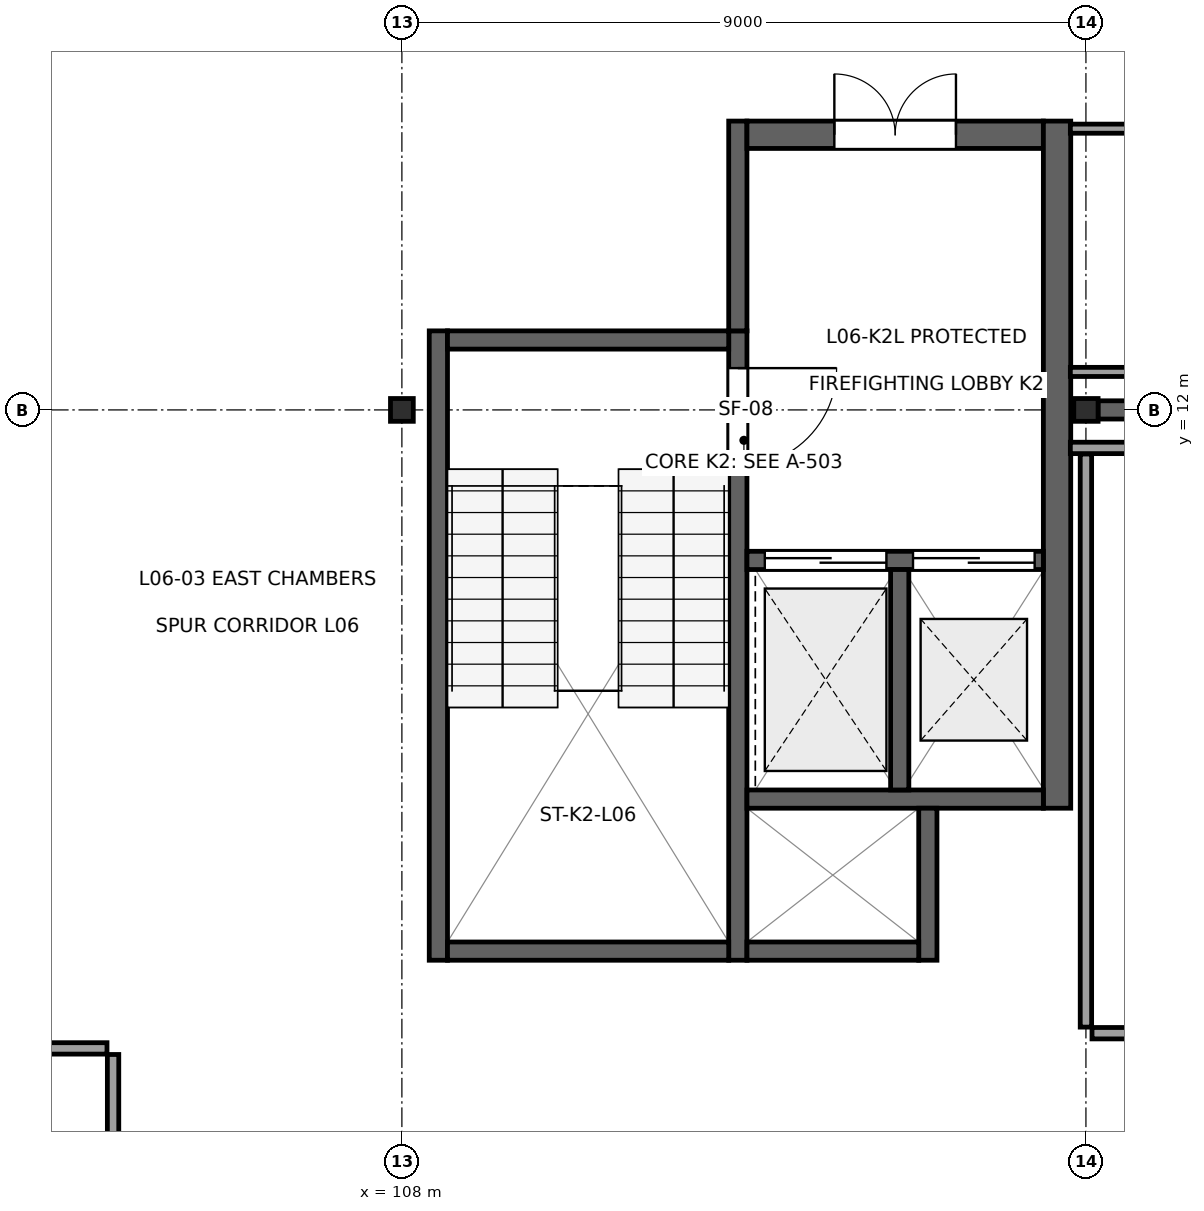
"""IFC4 building model, lengths in metres.
Left out: names, types, materials, properties, quantities, classifications, styles, units other than length and angle.
Written with IfcOpenShell. Run it as: python <this file> out.ifc"""

import sys

from ifc_helpers import new_model, si_unit, direction, frame, frame_2d, origin, origin_2d, place, context, subcontext, project, spatial, rectangle, i_section, extrude, element, fill, save


model = new_model("IFC4")
c1 = context("Model", 3, precision=1e-05, world=origin(), true_north=direction((0.0, 1.0)))
c2 = subcontext(c1, "Body", "Model", "MODEL_VIEW")
j1 = project(units=[si_unit("LENGTHUNIT", "METRE"), si_unit("PLANEANGLEUNIT", "RADIAN")], contexts=[c1])
p1 = place(None, origin())
s1 = spatial("IfcSite", under=j1, at=p1, CompositionType="ELEMENT")
p2 = place(p1, origin())
s2 = spatial("IfcBuilding", under=s1, at=p2, CompositionType="ELEMENT")
p3 = place(p2, frame((0.0, 0.0, 27.4)))
s3 = spatial("IfcBuildingStorey", under=s2, at=p3, CompositionType="ELEMENT", Elevation=27.4)
p4 = place(p3, frame((108.0, 12.0, 0.0), z_axis=(0.0, 0.0, 1.0), x_axis=(1.0, 0.0, 0.0)))
e1 = element("IfcColumn", 1, at=p4, inside=s3, PredefinedType="COLUMN", context=c2, shape_type="SweptSolid", body=[
    extrude(i_section(OverallWidth=0.3, OverallDepth=0.3, WebThickness=0.011, FlangeThickness=0.019, at=origin_2d()), origin(), (0.0, 0.0, 1.0), 4.0),
])
p5 = place(p3, frame((117.0, 12.0, 0.0), z_axis=(0.0, 0.0, 1.0), x_axis=(0.0, 1.0, 0.0)))
e2 = element("IfcColumn", 2, at=p5, inside=s3, PredefinedType="COLUMN", context=c2, shape_type="SweptSolid", body=[
    extrude(i_section(OverallWidth=0.3, OverallDepth=0.32, WebThickness=0.011, FlangeThickness=0.021, at=origin_2d()), origin(), (0.0, 0.0, 1.0), 4.0),
])
p6 = place(p3, frame((108.48, 4.76, 0.0), z_axis=(0.0, 0.0, 1.0), x_axis=(0.0, 1.0, 0.0)))
e3 = element("IfcWall", 3, at=p6, inside=s3, PredefinedType="SHEAR", context=c2, shape_type="SweptSolid", body=[
    extrude(rectangle(XDim=8.28, YDim=0.24, at=frame_2d((4.14, 0.0))), origin(), (0.0, 0.0, 1.0), 3.81),
])
p7 = place(p3, frame((112.42, 4.76, 0.0), z_axis=(0.0, 0.0, 1.0), x_axis=(0.0, 1.0, 0.0)))
e4 = element("IfcWall", 4, at=p7, inside=s3, PredefinedType="SHEAR", context=c2, shape_type="SweptSolid", body=[
    extrude(rectangle(XDim=8.28, YDim=0.24, at=frame_2d((4.14, 0.0))), origin(), (0.0, 0.0, 1.0), 3.81),
])
p8 = place(p7, frame((6.49, 0.0, 0.0)))
e5 = element("IfcOpeningElement", 5, at=p8, cuts=e4, PredefinedType="OPENING", context=c2, shape_type="SweptSolid", body=[
    extrude(rectangle(XDim=1.3, YDim=2.2, at=frame_2d((0.65, 1.1))), frame((0.0, 0.135, 0.0), z_axis=(0.0, -1.0, 0.0), x_axis=(1.0, 0.0, 0.0)), (0.0, 0.0, 1.0), 0.27),
])
for number, where, z_axis, x_axis in (
    (6, (108.6, 4.88, 0.0), (0.0, 0.0, 1.0), (1.0, 0.0, 0.0)),
    (7, (108.6, 12.92, 0.0), (0.0, 0.0, 1.0), (1.0, 0.0, 0.0)),
):
    element("IfcWall", number, at=place(p3, frame(where, z_axis=z_axis, x_axis=x_axis)), inside=s3, PredefinedType="SHEAR", context=c2, shape_type="SweptSolid", body=[
        extrude(rectangle(XDim=3.7, YDim=0.24, at=frame_2d((1.85, 0.0))), origin(), (0.0, 0.0, 1.0), 3.81),
    ])
p9 = place(p3, frame((112.42, 13.04, 0.0), z_axis=(0.0, 0.0, 1.0), x_axis=(0.0, 1.0, 0.0)))
e8 = element("IfcWall", 8, at=p9, inside=s3, PredefinedType="SHEAR", context=c2, shape_type="SweptSolid", body=[
    extrude(rectangle(XDim=2.76, YDim=0.24, at=frame_2d((1.38, 0.0))), origin(), (0.0, 0.0, 1.0), 3.66),
])
p10 = place(p3, frame((112.54, 15.62, 0.0), z_axis=(0.0, 0.0, 1.0), x_axis=(1.0, 0.0, 0.0)))
e9 = element("IfcWall", 9, at=p10, inside=s3, PredefinedType="SHEAR", context=c2, shape_type="SweptSolid", body=[
    extrude(rectangle(XDim=3.9, YDim=0.36, at=frame_2d((1.95, 0.0))), origin(), (0.0, 0.0, 1.0), 3.66),
])
p11 = place(p10, frame((1.15, 0.0, 0.0)))
e10 = element("IfcOpeningElement", 10, at=p11, cuts=e9, PredefinedType="OPENING", context=c2, shape_type="SweptSolid", body=[
    extrude(rectangle(XDim=1.6, YDim=2.25, at=frame_2d((0.8, 1.125))), frame((0.0, 0.195, 0.0), z_axis=(0.0, -1.0, 0.0), x_axis=(1.0, 0.0, 0.0)), (0.0, 0.0, 1.0), 0.39),
])
p12 = place(p3, frame((116.62, 6.76, 0.0), z_axis=(0.0, 0.0, 1.0), x_axis=(0.0, 1.0, 0.0)))
e11 = element("IfcWall", 11, at=p12, inside=s3, PredefinedType="SHEAR", context=c2, shape_type="SweptSolid", body=[
    extrude(rectangle(XDim=9.04, YDim=0.36, at=frame_2d((4.52, 0.0))), origin(), (0.0, 0.0, 1.0), 3.66),
])
p13 = place(p3, frame((112.54, 10.02, 0.0), z_axis=(0.0, 0.0, 1.0), x_axis=(1.0, 0.0, 0.0)))
e12 = element("IfcWall", 12, at=p13, inside=s3, PredefinedType="SHEAR", context=c2, shape_type="SweptSolid", body=[
    extrude(rectangle(XDim=3.9, YDim=0.24, at=frame_2d((1.95, 0.0))), origin(), (0.0, 0.0, 1.0), 3.81),
])
p14 = place(p13, frame((0.235, 0.0, 0.0)))
e13 = element("IfcOpeningElement", 13, at=p14, cuts=e12, PredefinedType="OPENING", context=c2, shape_type="SweptSolid", body=[
    extrude(rectangle(XDim=1.6, YDim=2.3, at=frame_2d((0.8, 1.15))), frame((0.0, 0.135, 0.0), z_axis=(0.0, -1.0, 0.0), x_axis=(1.0, 0.0, 0.0)), (0.0, 0.0, 1.0), 0.27),
])
p15 = place(p13, frame((2.185, 0.0, 0.0)))
e14 = element("IfcOpeningElement", 14, at=p15, cuts=e12, PredefinedType="OPENING", context=c2, shape_type="SweptSolid", body=[
    extrude(rectangle(XDim=1.6, YDim=2.3, at=frame_2d((0.8, 1.15))), frame((0.0, 0.135, 0.0), z_axis=(0.0, -1.0, 0.0), x_axis=(1.0, 0.0, 0.0)), (0.0, 0.0, 1.0), 0.27),
])
p16 = place(p3, frame((112.54, 6.88, 0.0), z_axis=(0.0, 0.0, 1.0), x_axis=(1.0, 0.0, 0.0)))
e15 = element("IfcWall", 15, at=p16, inside=s3, PredefinedType="SHEAR", context=c2, shape_type="SweptSolid", body=[
    extrude(rectangle(XDim=3.9, YDim=0.24, at=frame_2d((1.95, 0.0))), origin(), (0.0, 0.0, 1.0), 3.81),
])
p17 = place(p3, frame((114.55, 7.0, 0.0), z_axis=(0.0, 0.0, 1.0), x_axis=(0.0, 1.0, 0.0)))
e16 = element("IfcWall", 16, at=p17, inside=s3, PredefinedType="SHEAR", context=c2, shape_type="SweptSolid", body=[
    extrude(rectangle(XDim=2.9, YDim=0.24, at=frame_2d((1.45, 0.0))), origin(), (0.0, 0.0, 1.0), 3.81),
])
p18 = place(p3, frame((114.92, 4.76, 0.0), z_axis=(0.0, 0.0, 1.0), x_axis=(0.0, 1.0, 0.0)))
e17 = element("IfcWall", 17, at=p18, inside=s3, PredefinedType="SHEAR", context=c2, shape_type="SweptSolid", body=[
    extrude(rectangle(XDim=2.0, YDim=0.24, at=frame_2d((1.0, 0.0))), origin(), (0.0, 0.0, 1.0), 3.81),
])
p19 = place(p3, frame((112.54, 4.88, 0.0), z_axis=(0.0, 0.0, 1.0), x_axis=(1.0, 0.0, 0.0)))
e18 = element("IfcWall", 18, at=p19, inside=s3, PredefinedType="SHEAR", context=c2, shape_type="SweptSolid", body=[
    extrude(rectangle(XDim=2.26, YDim=0.24, at=frame_2d((1.13, 0.0))), origin(), (0.0, 0.0, 1.0), 3.81),
])
p20 = place(p3, frame((117.158, 12.0, 0.0), z_axis=(0.0, 0.0, 1.0), x_axis=(1.0, 0.0, 0.0)))
e19 = element("IfcWall", 19, at=p20, inside=s3, PredefinedType="SHEAR", context=c2, shape_type="SweptSolid", body=[
    extrude(rectangle(XDim=8.834, YDim=0.24, at=frame_2d((4.417, 0.0))), origin(), (0.0, 0.0, 1.0), 3.355),
])
p21 = place(p3, frame((45.88, 3.6, 0.0), z_axis=(0.0, 0.0, 1.0), x_axis=(1.0, 0.0, 0.0)))
e20 = element("IfcWall", 20, at=p21, inside=s3, PredefinedType="PARTITIONING", context=c2, shape_type="SweptSolid", body=[
    extrude(rectangle(XDim=58.24, YDim=0.15, at=frame_2d((29.12, 0.0))), origin(), (0.0, 0.0, 1.0), 3.64),
])
p22 = place(p21, frame((27.795, 0.0, 0.0)))
e21 = element("IfcOpeningElement", 21, at=p22, cuts=e20, PredefinedType="OPENING", context=c2, shape_type="SweptSolid", body=[
    extrude(rectangle(XDim=1.05, YDim=2.25, at=frame_2d((0.525, 1.125))), frame((0.0, 0.09, 0.0), z_axis=(0.0, -1.0, 0.0), x_axis=(1.0, 0.0, 0.0)), (0.0, 0.0, 1.0), 0.18),
])
p23 = place(p3, frame((104.2, 3.52, 0.0), z_axis=(0.0, 0.0, 1.0), x_axis=(0.0, -1.0, 0.0)))
e22 = element("IfcWall", 22, at=p23, inside=s3, PredefinedType="PARTITIONING", context=c2, shape_type="SweptSolid", body=[
    extrude(rectangle(XDim=3.385, YDim=0.15, at=frame_2d((1.692, 0.0))), origin(), (0.0, 0.0, 1.0), 3.64),
])
p24 = place(p3, frame((125.865, 3.8, 0.0), z_axis=(0.0, 0.0, 1.0), x_axis=(-1.0, 0.0, 0.0)))
e23 = element("IfcWall", 23, at=p24, inside=s3, PredefinedType="PARTITIONING", context=c2, shape_type="SweptSolid", body=[
    extrude(rectangle(XDim=8.785, YDim=0.15, at=frame_2d((4.393, 0.0))), origin(), (0.0, 0.0, 1.0), 3.64),
])
p25 = place(p24, frame((3.867, 0.0, 0.0)))
e24 = element("IfcOpeningElement", 24, at=p25, cuts=e23, PredefinedType="OPENING", context=c2, shape_type="SweptSolid", body=[
    extrude(rectangle(XDim=1.05, YDim=2.25, at=frame_2d((0.525, 1.125))), frame((0.0, 0.09, 0.0), z_axis=(0.0, -1.0, 0.0), x_axis=(1.0, 0.0, 0.0)), (0.0, 0.0, 1.0), 0.18),
])
p26 = place(p3, frame((117.0, 3.88, 0.0), z_axis=(0.0, 0.0, 1.0), x_axis=(0.0, 1.0, 0.0)))
e25 = element("IfcWall", 25, at=p26, inside=s3, PredefinedType="PARTITIONING", context=c2, shape_type="SweptSolid", body=[
    extrude(rectangle(XDim=7.54, YDim=0.15, at=frame_2d((3.77, 0.0))), origin(), (0.0, 0.0, 1.0), 3.355),
])
p27 = place(p3, frame((116.795, 11.5, 0.0), z_axis=(0.0, 0.0, 1.0), x_axis=(1.0, 0.0, 0.0)))
e26 = element("IfcWall", 26, at=p27, inside=s3, PredefinedType="PARTITIONING", context=c2, shape_type="SweptSolid", body=[
    extrude(rectangle(XDim=9.07, YDim=0.15, at=frame_2d((4.535, 0.0))), origin(), (0.0, 0.0, 1.0), 3.64),
])
p28 = place(p3, frame((125.865, 12.5, 0.0), z_axis=(0.0, 0.0, 1.0), x_axis=(-1.0, 0.0, 0.0)))
e27 = element("IfcWall", 27, at=p28, inside=s3, PredefinedType="PARTITIONING", context=c2, shape_type="SweptSolid", body=[
    extrude(rectangle(XDim=9.07, YDim=0.12, at=frame_2d((4.535, 0.0))), origin(), (0.0, 0.0, 1.0), 3.64),
])
p29 = place(p3, frame((116.795, 15.7, 0.0), z_axis=(0.0, 0.0, 1.0), x_axis=(1.0, 0.0, 0.0)))
e28 = element("IfcWall", 28, at=p29, inside=s3, PredefinedType="PARTITIONING", context=c2, shape_type="SweptSolid", body=[
    extrude(rectangle(XDim=9.07, YDim=0.12, at=frame_2d((4.535, 0.0))), origin(), (0.0, 0.0, 1.0), 3.64),
])
p30 = place(p29, frame((4.06, 0.0, 0.0)))
e29 = element("IfcOpeningElement", 29, at=p30, cuts=e28, PredefinedType="OPENING", context=c2, shape_type="SweptSolid", body=[
    extrude(rectangle(XDim=0.95, YDim=2.15, at=frame_2d((0.475, 1.075))), frame((0.0, 0.075, 0.0), z_axis=(0.0, -1.0, 0.0), x_axis=(1.0, 0.0, 0.0)), (0.0, 0.0, 1.0), 0.15),
])
p31 = place(p8, frame((1.3, 0.0, 0.0), z_axis=(0.0, 0.0, 1.0), x_axis=(-1.0, 0.0, 0.0)))
e30 = element("IfcDoor", 30, at=p31, inside=s3, OperationType="SINGLE_SWING_RIGHT", PredefinedType="DOOR", context=c2, shape_type="SweptSolid", body=[
    extrude(rectangle(XDim=1.3, YDim=2.2, at=frame_2d((0.65, 1.1))), frame((0.0, 0.025, 0.0), z_axis=(0.0, -1.0, 0.0), x_axis=(1.0, 0.0, 0.0)), (0.0, 0.0, 1.0), 0.05),
])
fill(e5, e30)
p32 = place(p11, origin())
e31 = element("IfcDoor", 31, at=p32, inside=s3, OperationType="DOUBLE_DOOR_SINGLE_SWING", PredefinedType="DOOR", context=c2, shape_type="SweptSolid", body=[
    extrude(rectangle(XDim=1.6, YDim=2.25, at=frame_2d((0.8, 1.125))), frame((0.0, 0.025, 0.0), z_axis=(0.0, -1.0, 0.0), x_axis=(1.0, 0.0, 0.0)), (0.0, 0.0, 1.0), 0.05),
])
fill(e10, e31)
p33 = place(p14, origin())
e32 = element("IfcDoor", 32, at=p33, inside=s3, OperationType="DOUBLE_DOOR_SLIDING", PredefinedType="DOOR", context=c2, shape_type="SweptSolid", body=[
    extrude(rectangle(XDim=1.6, YDim=2.3, at=frame_2d((0.8, 1.15))), frame((0.0, 0.025, 0.0), z_axis=(0.0, -1.0, 0.0), x_axis=(1.0, 0.0, 0.0)), (0.0, 0.0, 1.0), 0.05),
])
fill(e13, e32)
p34 = place(p15, origin())
e33 = element("IfcDoor", 33, at=p34, inside=s3, OperationType="DOUBLE_DOOR_SLIDING", PredefinedType="DOOR", context=c2, shape_type="SweptSolid", body=[
    extrude(rectangle(XDim=1.6, YDim=2.3, at=frame_2d((0.8, 1.15))), frame((0.0, 0.025, 0.0), z_axis=(0.0, -1.0, 0.0), x_axis=(1.0, 0.0, 0.0)), (0.0, 0.0, 1.0), 0.05),
])
fill(e14, e33)
save(model, sys.argv[1])
